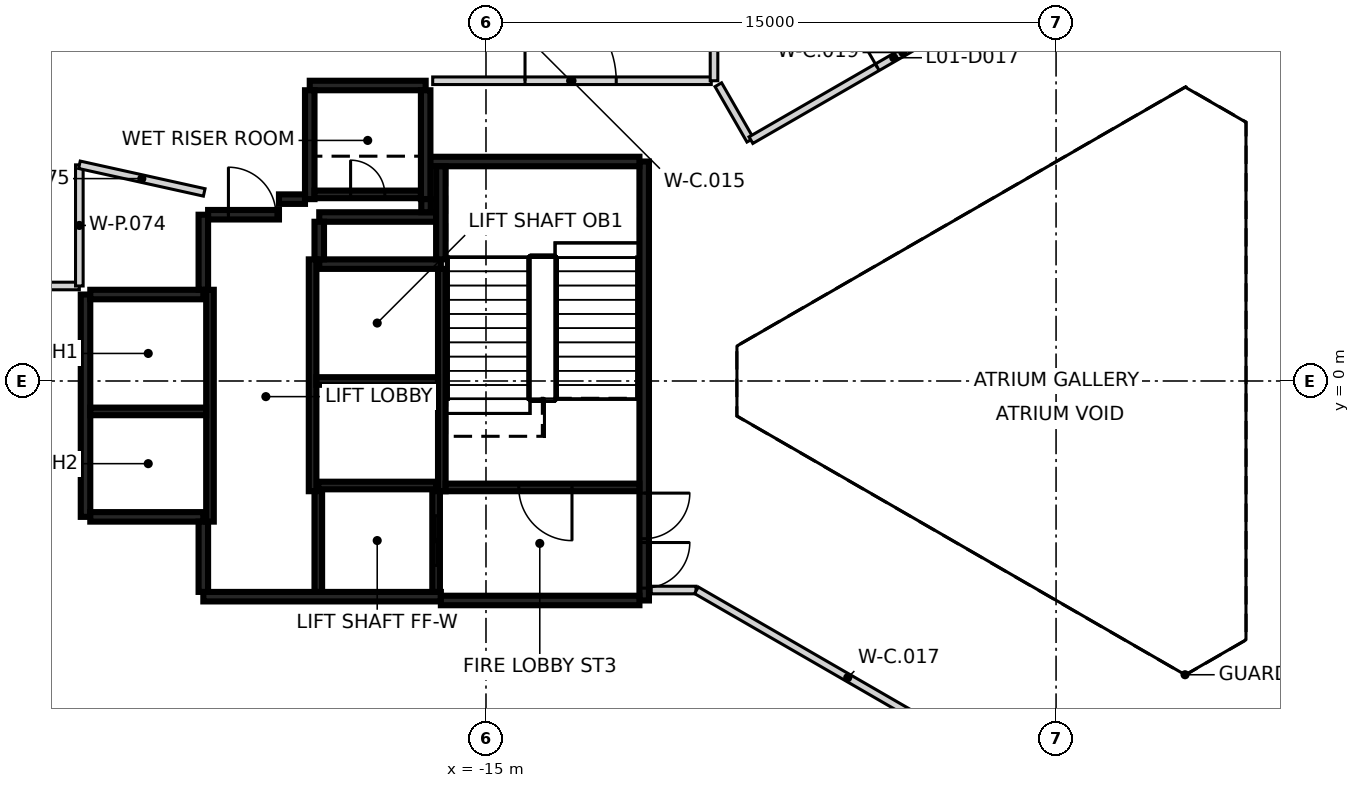
"""IFC4 building model, lengths in metres.
Left out: names, types, materials, properties, quantities, classifications, styles, units other than length and angle.
Written with IfcOpenShell. Run it as: python <this file> out.ifc"""

import sys

from ifc_helpers import new_model, si_unit, direction, frame, frame_2d, origin, place, context, subcontext, project, spatial, rectangle, extrude, element, fill, save


model = new_model("IFC4")
c1 = context("Model", 3, precision=1e-05, world=origin(), true_north=direction((0.0, 1.0)))
c2 = subcontext(c1, "Body", "Model", "MODEL_VIEW")
j1 = project(units=[si_unit("LENGTHUNIT", "METRE"), si_unit("PLANEANGLEUNIT", "RADIAN")], contexts=[c1])
p1 = place(None, origin())
s1 = spatial("IfcSite", under=j1, at=p1, CompositionType="ELEMENT")
p2 = place(p1, origin())
s2 = spatial("IfcBuilding", under=s1, at=p2, CompositionType="ELEMENT")
p3 = place(p2, frame((0.0, 0.0, 7.5)))
s3 = spatial("IfcBuildingStorey", under=s2, at=p3, CompositionType="ELEMENT", Elevation=7.5)
p4 = place(p3, frame((-10.837, 5.775, 0.0), z_axis=(0.0, 0.0, 1.0), x_axis=(0.0, -1.0, 0.0)))
e1 = element("IfcWall", 1, at=p4, inside=s3, PredefinedType="SHEAR", context=c2, shape_type="SweptSolid", body=[
    extrude(rectangle(XDim=11.55, YDim=0.25, at=frame_2d((5.775, 0.0))), origin(), (0.0, 0.0, 1.0), 6.15),
])
p5 = place(p4, frame((10.025, 0.0, 0.0)))
e2 = element("IfcOpeningElement", 2, at=p5, cuts=e1, PredefinedType="OPENING", context=c2, shape_type="SweptSolid", body=[
    extrude(rectangle(XDim=1.2, YDim=2.1, at=frame_2d((0.6, 1.05))), frame((0.0, 0.135, 0.0), z_axis=(0.0, -1.0, 0.0), x_axis=(1.0, 0.0, 0.0)), (0.0, 0.0, 1.0), 0.27),
])
p6 = place(p4, frame((8.725, 0.0, 0.0)))
e3 = element("IfcOpeningElement", 3, at=p6, cuts=e1, PredefinedType="OPENING", context=c2, shape_type="SweptSolid", body=[
    extrude(rectangle(XDim=1.2, YDim=2.1, at=frame_2d((0.6, 1.05))), frame((0.0, 0.135, 0.0), z_axis=(0.0, -1.0, 0.0), x_axis=(1.0, 0.0, 0.0)), (0.0, 0.0, 1.0), 0.27),
])
p7 = place(p3, frame((-16.187, -5.675, 0.0), z_axis=(0.0, 0.0, 1.0), x_axis=(-1.0, 0.0, 0.0)))
e4 = element("IfcWall", 4, at=p7, inside=s3, PredefinedType="SHEAR", context=c2, shape_type="SweptSolid", body=[
    extrude(rectangle(XDim=6.25, YDim=0.25, at=frame_2d((3.125, 0.0))), origin(), (0.0, 0.0, 1.0), 6.15),
])
p8 = place(p3, frame((-25.537, -3.575, 0.0), z_axis=(0.0, 0.0, 1.0), x_axis=(0.0, 1.0, 0.0)))
e5 = element("IfcWall", 5, at=p8, inside=s3, PredefinedType="SHEAR", context=c2, shape_type="SweptSolid", body=[
    extrude(rectangle(XDim=5.85, YDim=0.25, at=frame_2d((2.925, 0.0))), origin(), (0.0, 0.0, 1.0), 6.15),
])
p9 = place(p3, frame((-10.963, -5.775, 0.0), z_axis=(0.0, 0.0, 1.0), x_axis=(-1.0, 0.0, 0.0)))
e6 = element("IfcWall", 6, at=p9, inside=s3, PredefinedType="SHEAR", context=c2, shape_type="SweptSolid", body=[
    extrude(rectangle(XDim=5.225, YDim=0.25, at=frame_2d((2.612, 0.0))), origin(), (0.0, 0.0, 1.0), 6.15),
])
p10 = place(p3, frame((-16.472, 5.775, 0.0), z_axis=(0.0, 0.0, 1.0), x_axis=(1.0, 0.0, 0.0)))
e7 = element("IfcWall", 7, at=p10, inside=s3, PredefinedType="SHEAR", context=c2, shape_type="SweptSolid", body=[
    extrude(rectangle(XDim=5.51, YDim=0.25, at=frame_2d((2.755, 0.0))), origin(), (0.0, 0.0, 1.0), 6.15),
])
p11 = place(p3, frame((-19.387, 3.075, 0.0), z_axis=(0.0, 0.0, 1.0), x_axis=(1.0, 0.0, 0.0)))
e8 = element("IfcWall", 8, at=p11, inside=s3, PredefinedType="SHEAR", context=c2, shape_type="SweptSolid", body=[
    extrude(rectangle(XDim=3.2, YDim=0.25, at=frame_2d((1.6, 0.0))), origin(), (0.0, 0.0, 1.0), 6.15),
])
for number, where, z_axis, x_axis in (
    (9, (-22.437, -3.575, 0.0), (0.0, 0.0, 1.0), (-1.0, 0.0, 0.0)),
    (10, (-25.412, 2.275, 0.0), (0.0, 0.0, 1.0), (1.0, 0.0, 0.0)),
):
    element("IfcWall", number, at=place(p3, frame(where, z_axis=z_axis, x_axis=x_axis)), inside=s3, PredefinedType="SHEAR", context=c2, shape_type="SweptSolid", body=[
        extrude(rectangle(XDim=2.975, YDim=0.25, at=frame_2d((1.487, 0.0))), origin(), (0.0, 0.0, 1.0), 6.15),
    ])
p12 = place(p3, frame((-19.637, 7.775, 0.0), z_axis=(0.0, 0.0, 1.0), x_axis=(1.0, 0.0, 0.0)))
e11 = element("IfcWall", 11, at=p12, inside=s3, PredefinedType="SHEAR", context=c2, shape_type="SweptSolid", body=[
    extrude(rectangle(XDim=3.05, YDim=0.25, at=frame_2d((1.525, 0.0))), origin(), (0.0, 0.0, 1.0), 6.15),
])
for number, where, z_axis, x_axis in (
    (12, (-16.587, 7.65, 0.0), (0.0, 0.0, 1.0), (0.0, -1.0, 0.0)),
    (13, (-19.637, 4.785, 0.0), (0.0, 0.0, 1.0), (0.0, 1.0, 0.0)),
):
    element("IfcWall", number, at=place(p3, frame(where, z_axis=z_axis, x_axis=x_axis)), inside=s3, PredefinedType="SHEAR", context=c2, shape_type="SweptSolid", body=[
        extrude(rectangle(XDim=2.865, YDim=0.25, at=frame_2d((1.432, 0.0))), origin(), (0.0, 0.0, 1.0), 6.15),
    ])
p13 = place(p3, frame((-16.302, 4.315, 0.0), z_axis=(0.0, 0.0, 1.0), x_axis=(-1.0, 0.0, 0.0)))
e14 = element("IfcWall", 14, at=p13, inside=s3, PredefinedType="SHEAR", context=c2, shape_type="SweptSolid", body=[
    extrude(rectangle(XDim=3.085, YDim=0.25, at=frame_2d((1.542, 0.0))), origin(), (0.0, 0.0, 1.0), 6.15),
])
p14 = place(p3, frame((-16.187, 3.2, 0.0), z_axis=(0.0, 0.0, 1.0), x_axis=(0.0, 1.0, 0.0)))
e15 = element("IfcWall", 15, at=p14, inside=s3, PredefinedType="SHEAR", context=c2, shape_type="SweptSolid", body=[
    extrude(rectangle(XDim=2.449, YDim=0.25, at=frame_2d((1.225, 0.0))), origin(), (0.0, 0.0, 1.0), 6.15),
])
p15 = place(p3, frame((-22.437, 2.4, 0.0), z_axis=(0.0, 0.0, 1.0), x_axis=(0.0, 1.0, 0.0)))
e16 = element("IfcWall", 16, at=p15, inside=s3, PredefinedType="SHEAR", context=c2, shape_type="SweptSolid", body=[
    extrude(rectangle(XDim=1.975, YDim=0.25, at=frame_2d((0.987, 0.0))), origin(), (0.0, 0.0, 1.0), 6.15),
])
p16 = place(p3, frame((-22.437, -5.55, 0.0), z_axis=(0.0, 0.0, 1.0), x_axis=(0.0, 1.0, 0.0)))
e17 = element("IfcWall", 17, at=p16, inside=s3, PredefinedType="SHEAR", context=c2, shape_type="SweptSolid", body=[
    extrude(rectangle(XDim=1.849, YDim=0.25, at=frame_2d((0.925, 0.0))), origin(), (0.0, 0.0, 1.0), 6.15),
])
p17 = place(p3, frame((-22.312, 4.375, 0.0), z_axis=(0.0, 0.0, 1.0), x_axis=(1.0, 0.0, 0.0)))
e18 = element("IfcWall", 18, at=p17, inside=s3, PredefinedType="SHEAR", context=c2, shape_type="SweptSolid", body=[
    extrude(rectangle(XDim=1.865, YDim=0.25, at=frame_2d((0.932, 0.0))), origin(), (0.0, 0.0, 1.0), 6.15),
])
p18 = place(p17, frame((0.535, 0.0, 0.0)))
e19 = element("IfcOpeningElement", 19, at=p18, cuts=e18, PredefinedType="OPENING", context=c2, shape_type="SweptSolid", body=[
    extrude(rectangle(XDim=1.25, YDim=2.1, at=frame_2d((0.625, 1.05))), frame((0.0, 0.135, 0.0), z_axis=(0.0, -1.0, 0.0), x_axis=(1.0, 0.0, 0.0)), (0.0, 0.0, 1.0), 0.27),
])
p19 = place(p3, frame((-19.387, 4.19, 0.0), z_axis=(0.0, 0.0, 1.0), x_axis=(0.0, -1.0, 0.0)))
e20 = element("IfcWall", 20, at=p19, inside=s3, PredefinedType="SHEAR", context=c2, shape_type="SweptSolid", body=[
    extrude(rectangle(XDim=0.989, YDim=0.25, at=frame_2d((0.495, 0.0))), origin(), (0.0, 0.0, 1.0), 6.15),
])
p20 = place(p3, frame((-20.447, 4.785, 0.0), z_axis=(0.0, 0.0, 1.0), x_axis=(1.0, 0.0, 0.0)))
e21 = element("IfcWall", 21, at=p20, inside=s3, PredefinedType="SHEAR", context=c2, shape_type="SweptSolid", body=[
    extrude(rectangle(XDim=0.685, YDim=0.25, at=frame_2d((0.342, 0.0))), origin(), (0.0, 0.0, 1.0), 6.15),
])
p21 = place(p3, frame((-16.577, 4.785, 0.0), z_axis=(0.0, 0.0, 1.0), x_axis=(0.0, -1.0, 0.0)))
e22 = element("IfcWall", 22, at=p21, inside=s3, PredefinedType="SHEAR", context=c2, shape_type="SweptSolid", body=[
    extrude(rectangle(XDim=0.344, YDim=0.25, at=frame_2d((0.172, 0.0))), origin(), (0.0, 0.0, 1.0), 6.15),
])
p22 = place(p3, frame((-16.162, 2.951, 0.0), z_axis=(0.0, 0.0, 1.0), x_axis=(0.0, -1.0, 0.0)))
e23 = element("IfcWall", 23, at=p22, inside=s3, PredefinedType="SHEAR", context=c2, shape_type="SweptSolid", body=[
    extrude(rectangle(XDim=5.851, YDim=0.2, at=frame_2d((2.925, 0.0))), origin(), (0.0, 0.0, 1.0), 6.15),
])
for number, where, z_axis, x_axis in (
    (24, (-19.562, -2.9, 0.0), (0.0, 0.0, 1.0), (0.0, 1.0, 0.0)),
    (25, (-22.262, 2.4, 0.0), (0.0, 0.0, 1.0), (0.0, -1.0, 0.0)),
):
    element("IfcWall", number, at=place(p3, frame(where, z_axis=z_axis, x_axis=x_axis)), inside=s3, PredefinedType="SHEAR", context=c2, shape_type="SweptSolid", body=[
        extrude(rectangle(XDim=6.1, YDim=0.2, at=frame_2d((3.05, 0.0))), origin(), (0.0, 0.0, 1.0), 6.15),
    ])
p23 = place(p3, frame((-10.963, -2.8, 0.0), z_axis=(0.0, 0.0, 1.0), x_axis=(-1.0, 0.0, 0.0)))
e26 = element("IfcWall", 26, at=p23, inside=s3, PredefinedType="SHEAR", context=c2, shape_type="SweptSolid", body=[
    extrude(rectangle(XDim=5.098, YDim=0.2, at=frame_2d((2.549, 0.0))), origin(), (0.0, 0.0, 1.0), 6.15),
])
p24 = place(p23, frame((1.774, 0.0, 0.0)))
e27 = element("IfcOpeningElement", 27, at=p24, cuts=e26, PredefinedType="OPENING", context=c2, shape_type="SweptSolid", body=[
    extrude(rectangle(XDim=1.4, YDim=2.1, at=frame_2d((0.7, 1.05))), frame((0.0, 0.11, 0.0), z_axis=(0.0, -1.0, 0.0), x_axis=(1.0, 0.0, 0.0)), (0.0, 0.0, 1.0), 0.22),
])
p25 = place(p3, frame((-16.263, 0.0, 0.0), z_axis=(0.0, 0.0, 1.0), x_axis=(-1.0, 0.0, 0.0)))
e28 = element("IfcWall", 28, at=p25, inside=s3, PredefinedType="SHEAR", context=c2, shape_type="SweptSolid", body=[
    extrude(rectangle(XDim=3.198, YDim=0.2, at=frame_2d((1.599, 0.0))), origin(), (0.0, 0.0, 1.0), 6.15),
])
p26 = place(p3, frame((-22.363, -0.8, 0.0), z_axis=(0.0, 0.0, 1.0), x_axis=(-1.0, 0.0, 0.0)))
e29 = element("IfcWall", 29, at=p26, inside=s3, PredefinedType="SHEAR", context=c2, shape_type="SweptSolid", body=[
    extrude(rectangle(XDim=3.048, YDim=0.2, at=frame_2d((1.524, 0.0))), origin(), (0.0, 0.0, 1.0), 6.15),
])
p27 = place(p3, frame((-19.511, 4.91, 0.0), z_axis=(0.0, 0.0, 1.0), x_axis=(1.0, 0.0, 0.0)))
e30 = element("IfcWall", 30, at=p27, inside=s3, PredefinedType="SHEAR", context=c2, shape_type="SweptSolid", body=[
    extrude(rectangle(XDim=2.798, YDim=0.2, at=frame_2d((1.399, 0.0))), origin(), (0.0, 0.0, 1.0), 6.15),
])
p28 = place(p27, frame((0.949, 0.0, 0.0)))
e31 = element("IfcOpeningElement", 31, at=p28, cuts=e30, PredefinedType="OPENING", context=c2, shape_type="SweptSolid", body=[
    extrude(rectangle(XDim=0.9, YDim=2.1, at=frame_2d((0.45, 1.05))), frame((0.0, 0.11, 0.0), z_axis=(0.0, -1.0, 0.0), x_axis=(1.0, 0.0, 0.0)), (0.0, 0.0, 1.0), 0.22),
])
p29 = place(p3, frame((-19.412, -2.75, 0.0), z_axis=(0.0, 0.0, 1.0), x_axis=(1.0, 0.0, 0.0)))
e32 = element("IfcWall", 32, at=p29, inside=s3, PredefinedType="SHEAR", context=c2, shape_type="SweptSolid", body=[
    extrude(rectangle(XDim=3.1, YDim=0.2, at=frame_2d((1.55, 0.0))), origin(), (0.0, 0.0, 1.0), 6.15),
])
p30 = place(p3, frame((-16.312, -2.898, 0.0), z_axis=(0.0, 0.0, 1.0), x_axis=(0.0, -1.0, 0.0)))
e33 = element("IfcWall", 33, at=p30, inside=s3, PredefinedType="SHEAR", context=c2, shape_type="SweptSolid", body=[
    extrude(rectangle(XDim=2.651, YDim=0.2, at=frame_2d((1.325, 0.0))), origin(), (0.0, 0.0, 1.0), 6.15),
])
p31 = place(p30, frame((0.652, 0.0, 0.0)))
e34 = element("IfcOpeningElement", 34, at=p31, cuts=e33, PredefinedType="OPENING", context=c2, shape_type="SweptSolid", body=[
    extrude(rectangle(XDim=1.3, YDim=2.1, at=frame_2d((0.65, 1.05))), frame((0.0, 0.11, 0.0), z_axis=(0.0, -1.0, 0.0), x_axis=(1.0, 0.0, 0.0)), (0.0, 0.0, 1.0), 0.22),
])
p32 = place(p3, frame((-19.412, -5.549, 0.0), z_axis=(0.0, 0.0, 1.0), x_axis=(0.0, 1.0, 0.0)))
e35 = element("IfcWall", 35, at=p32, inside=s3, PredefinedType="SHEAR", context=c2, shape_type="SweptSolid", body=[
    extrude(rectangle(XDim=2.651, YDim=0.2, at=frame_2d((1.325, 0.0))), origin(), (0.0, 0.0, 1.0), 6.15),
])
p33 = place(p3, frame((10.42, 6.498, 0.0), z_axis=(0.0, 0.0, 1.0), x_axis=(-0.866021906294, 0.500006057782, 0.0)))
e36 = element("IfcWall", 36, at=p33, inside=s3, PredefinedType="SHEAR", context=c2, shape_type="SweptSolid", body=[
    extrude(rectangle(XDim=11.55, YDim=0.25, at=frame_2d((5.775, 0.0))), origin(), (0.0, 0.0, 1.0), 6.15),
])
p34 = place(p33, frame((10.025, 0.0, 0.0)))
e37 = element("IfcOpeningElement", 37, at=p34, cuts=e36, PredefinedType="OPENING", context=c2, shape_type="SweptSolid", body=[
    extrude(rectangle(XDim=1.2, YDim=2.1, at=frame_2d((0.6, 1.05))), frame((0.0, 0.135, 0.0), z_axis=(0.0, -1.0, 0.0), x_axis=(1.0, 0.0, 0.0)), (0.0, 0.0, 1.0), 0.27),
])
p35 = place(p33, frame((8.725, 0.0, 0.0)))
e38 = element("IfcOpeningElement", 38, at=p35, cuts=e36, PredefinedType="OPENING", context=c2, shape_type="SweptSolid", body=[
    extrude(rectangle(XDim=1.2, YDim=2.1, at=frame_2d((0.6, 1.05))), frame((0.0, 0.135, 0.0), z_axis=(0.0, -1.0, 0.0), x_axis=(1.0, 0.0, 0.0)), (0.0, 0.0, 1.0), 0.27),
])
p36 = place(p3, frame((0.417, -12.273, 0.0), z_axis=(0.0, 0.0, 1.0), x_axis=(0.866021906294, 0.500006057782, 0.0)))
e39 = element("IfcWall", 39, at=p36, inside=s3, PredefinedType="SHEAR", context=c2, shape_type="SweptSolid", body=[
    extrude(rectangle(XDim=11.55, YDim=0.25, at=frame_2d((5.775, 0.0))), origin(), (0.0, 0.0, 1.0), 6.15),
])
p37 = place(p36, frame((10.025, 0.0, 0.0)))
e40 = element("IfcOpeningElement", 40, at=p37, cuts=e39, PredefinedType="OPENING", context=c2, shape_type="SweptSolid", body=[
    extrude(rectangle(XDim=1.2, YDim=2.1, at=frame_2d((0.6, 1.05))), frame((0.0, 0.135, 0.0), z_axis=(0.0, -1.0, 0.0), x_axis=(1.0, 0.0, 0.0)), (0.0, 0.0, 1.0), 0.27),
])
p38 = place(p36, frame((8.725, 0.0, 0.0)))
e41 = element("IfcOpeningElement", 41, at=p38, cuts=e39, PredefinedType="OPENING", context=c2, shape_type="SweptSolid", body=[
    extrude(rectangle(XDim=1.2, YDim=2.1, at=frame_2d((0.6, 1.05))), frame((0.0, 0.135, 0.0), z_axis=(0.0, -1.0, 0.0), x_axis=(1.0, 0.0, 0.0)), (0.0, 0.0, 1.0), 0.27),
])
p39 = place(p3, frame((-16.402, 7.9, 0.0), z_axis=(0.0, 0.0, 1.0), x_axis=(1.0, 0.0, 0.0)))
e42 = element("IfcWall", 42, at=p39, inside=s3, PredefinedType="PARTITIONING", context=c2, shape_type="SweptSolid", body=[
    extrude(rectangle(XDim=7.33, YDim=0.2, at=frame_2d((3.665, 0.0))), origin(), (0.0, 0.0, 1.0), 6.15),
])
p40 = place(p39, frame((2.429, 0.0, 0.0)))
e43 = element("IfcOpeningElement", 43, at=p40, cuts=e42, PredefinedType="OPENING", context=c2, shape_type="SweptSolid", body=[
    extrude(rectangle(XDim=2.4, YDim=2.1, at=frame_2d((1.2, 1.05))), frame((0.0, 0.11, 0.0), z_axis=(0.0, -1.0, 0.0), x_axis=(1.0, 0.0, 0.0)), (0.0, 0.0, 1.0), 0.22),
])
p41 = place(p3, frame((-10.652, -5.5, 0.0), z_axis=(0.0, 0.0, 1.0), x_axis=(1.0, 0.0, 0.0)))
e44 = element("IfcWall", 44, at=p41, inside=s3, PredefinedType="PARTITIONING", context=c2, shape_type="SweptSolid", body=[
    extrude(rectangle(XDim=1.178, YDim=0.2, at=frame_2d((0.589, 0.0))), origin(), (0.0, 0.0, 1.0), 6.15),
])
p42 = place(p3, frame((-9.462, -5.507, 0.0), z_axis=(0.0, 0.0, 1.0), x_axis=(0.865993634668, -0.500055021687, 0.0)))
e45 = element("IfcWall", 45, at=p42, inside=s3, PredefinedType="PARTITIONING", context=c2, shape_type="SweptSolid", body=[
    extrude(rectangle(XDim=9.193, YDim=0.2, at=frame_2d((4.596, 0.0))), origin(), (0.0, 0.0, 1.0), 6.15),
])
p43 = place(p3, frame((-8.887, 7.796, 0.0), z_axis=(0.0, 0.0, 1.0), x_axis=(0.49888522925, -0.866668061046, 0.0)))
e46 = element("IfcWall", 46, at=p43, inside=s3, PredefinedType="PARTITIONING", context=c2, shape_type="SweptSolid", body=[
    extrude(rectangle(XDim=1.683, YDim=0.2, at=frame_2d((0.842, 0.0))), origin(), (0.0, 0.0, 1.0), 6.15),
])
p44 = place(p3, frame((-8.029, 6.337, 0.0), z_axis=(0.0, 0.0, 1.0), x_axis=(0.866104553896, 0.499862882919, 0.0)))
e47 = element("IfcWall", 47, at=p44, inside=s3, PredefinedType="PARTITIONING", context=c2, shape_type="SweptSolid", body=[
    extrude(rectangle(XDim=9.23, YDim=0.2, at=frame_2d((4.615, 0.0))), origin(), (0.0, 0.0, 1.0), 6.15),
])
p45 = place(p44, frame((3.839, 0.0, 0.0)))
e48 = element("IfcOpeningElement", 48, at=p45, cuts=e47, PredefinedType="OPENING", context=c2, shape_type="SweptSolid", body=[
    extrude(rectangle(XDim=1.0, YDim=2.1, at=frame_2d((0.5, 1.05))), frame((0.0, 0.11, 0.0), z_axis=(0.0, -1.0, 0.0), x_axis=(1.0, 0.0, 0.0)), (0.0, 0.0, 1.0), 0.22),
])
p46 = place(p3, frame((-38.998, 2.5, 0.0), z_axis=(0.0, 0.0, 1.0), x_axis=(1.0, 0.0, 0.0)))
e49 = element("IfcWall", 49, at=p46, inside=s3, PredefinedType="PARTITIONING", context=c2, shape_type="SweptSolid", body=[
    extrude(rectangle(XDim=13.298, YDim=0.2, at=frame_2d((6.649, 0.0))), origin(), (0.0, 0.0, 1.0), 6.15),
])
p47 = place(p3, frame((-25.7, 2.5, 0.0), z_axis=(0.0, 0.0, 1.0), x_axis=(0.0, 1.0, 0.0)))
e50 = element("IfcWall", 50, at=p47, inside=s3, PredefinedType="PARTITIONING", context=c2, shape_type="SweptSolid", body=[
    extrude(rectangle(XDim=3.187, YDim=0.2, at=frame_2d((1.594, 0.0))), origin(), (0.0, 0.0, 1.0), 6.15),
])
p48 = place(p3, frame((-25.698, 5.689, 0.0), z_axis=(0.0, 0.0, 1.0), x_axis=(0.976357548796, -0.216161830371, 0.0)))
e51 = element("IfcWall", 51, at=p48, inside=s3, PredefinedType="PARTITIONING", context=c2, shape_type="SweptSolid", body=[
    extrude(rectangle(XDim=3.364, YDim=0.2, at=frame_2d((1.682, 0.0))), origin(), (0.0, 0.0, 1.0), 6.15),
])
p49 = place(p3, frame((-9.0, 7.9, 0.0), z_axis=(0.0, 0.0, 1.0), x_axis=(0.0, 1.0, 0.0)))
e52 = element("IfcWall", 52, at=p49, inside=s3, PredefinedType="PARTITIONING", context=c2, shape_type="SweptSolid", body=[
    extrude(rectangle(XDim=3.5, YDim=0.2, at=frame_2d((1.75, 0.0))), origin(), (0.0, 0.0, 1.0), 6.15),
])
p50 = place(p31, origin())
e53 = element("IfcDoor", 53, at=p50, inside=s3, OperationType="SLIDING_TO_RIGHT", PredefinedType="DOOR", context=c2, shape_type="SweptSolid", body=[
    extrude(rectangle(XDim=1.3, YDim=2.1, at=frame_2d((0.65, 1.05))), frame((0.0, 0.025, 0.0), z_axis=(0.0, -1.0, 0.0), x_axis=(1.0, 0.0, 0.0)), (0.0, 0.0, 1.0), 0.05),
])
fill(e34, e53)
p51 = place(p18, origin())
e54 = element("IfcDoor", 54, at=p51, inside=s3, OperationType="SINGLE_SWING_LEFT", PredefinedType="DOOR", context=c2, shape_type="SweptSolid", body=[
    extrude(rectangle(XDim=1.25, YDim=2.1, at=frame_2d((0.625, 1.05))), frame((0.0, 0.025, 0.0), z_axis=(0.0, -1.0, 0.0), x_axis=(1.0, 0.0, 0.0)), (0.0, 0.0, 1.0), 0.05),
])
fill(e19, e54)
p52 = place(p5, origin())
e55 = element("IfcDoor", 55, at=p52, inside=s3, OperationType="SINGLE_SWING_LEFT", PredefinedType="DOOR", context=c2, shape_type="SweptSolid", body=[
    extrude(rectangle(XDim=1.2, YDim=2.1, at=frame_2d((0.6, 1.05))), frame((0.0, 0.025, 0.0), z_axis=(0.0, -1.0, 0.0), x_axis=(1.0, 0.0, 0.0)), (0.0, 0.0, 1.0), 0.05),
])
fill(e2, e55)
p53 = place(p6, origin())
e56 = element("IfcDoor", 56, at=p53, inside=s3, OperationType="SINGLE_SWING_RIGHT", PredefinedType="DOOR", context=c2, shape_type="SweptSolid", body=[
    extrude(rectangle(XDim=1.2, YDim=2.1, at=frame_2d((0.6, 1.05))), frame((0.0, 0.025, 0.0), z_axis=(0.0, -1.0, 0.0), x_axis=(1.0, 0.0, 0.0)), (0.0, 0.0, 1.0), 0.05),
])
fill(e3, e56)
p54 = place(p24, origin())
e57 = element("IfcDoor", 57, at=p54, inside=s3, OperationType="SINGLE_SWING_RIGHT", PredefinedType="DOOR", context=c2, shape_type="SweptSolid", body=[
    extrude(rectangle(XDim=1.4, YDim=2.1, at=frame_2d((0.7, 1.05))), frame((0.0, 0.025, 0.0), z_axis=(0.0, -1.0, 0.0), x_axis=(1.0, 0.0, 0.0)), (0.0, 0.0, 1.0), 0.05),
])
fill(e27, e57)
p55 = place(p28, origin())
e58 = element("IfcDoor", 58, at=p55, inside=s3, OperationType="SINGLE_SWING_LEFT", PredefinedType="DOOR", context=c2, shape_type="SweptSolid", body=[
    extrude(rectangle(XDim=0.9, YDim=2.1, at=frame_2d((0.45, 1.05))), frame((0.0, 0.025, 0.0), z_axis=(0.0, -1.0, 0.0), x_axis=(1.0, 0.0, 0.0)), (0.0, 0.0, 1.0), 0.05),
])
fill(e31, e58)
p56 = place(p40, frame((2.4, 0.0, 0.0), z_axis=(0.0, 0.0, 1.0), x_axis=(-1.0, 0.0, 0.0)))
e59 = element("IfcDoor", 59, at=p56, inside=s3, OperationType="DOUBLE_DOOR_SINGLE_SWING", PredefinedType="DOOR", context=c2, shape_type="SweptSolid", body=[
    extrude(rectangle(XDim=2.4, YDim=2.1, at=frame_2d((1.2, 1.05))), frame((0.0, 0.025, 0.0), z_axis=(0.0, -1.0, 0.0), x_axis=(1.0, 0.0, 0.0)), (0.0, 0.0, 1.0), 0.05),
])
fill(e43, e59)
p57 = place(p45, origin())
e60 = element("IfcDoor", 60, at=p57, inside=s3, OperationType="SINGLE_SWING_LEFT", PredefinedType="DOOR", context=c2, shape_type="SweptSolid", body=[
    extrude(rectangle(XDim=1.0, YDim=2.1, at=frame_2d((0.5, 1.05))), frame((0.0, 0.025, 0.0), z_axis=(0.0, -1.0, 0.0), x_axis=(1.0, 0.0, 0.0)), (0.0, 0.0, 1.0), 0.05),
])
fill(e48, e60)
save(model, sys.argv[1])
